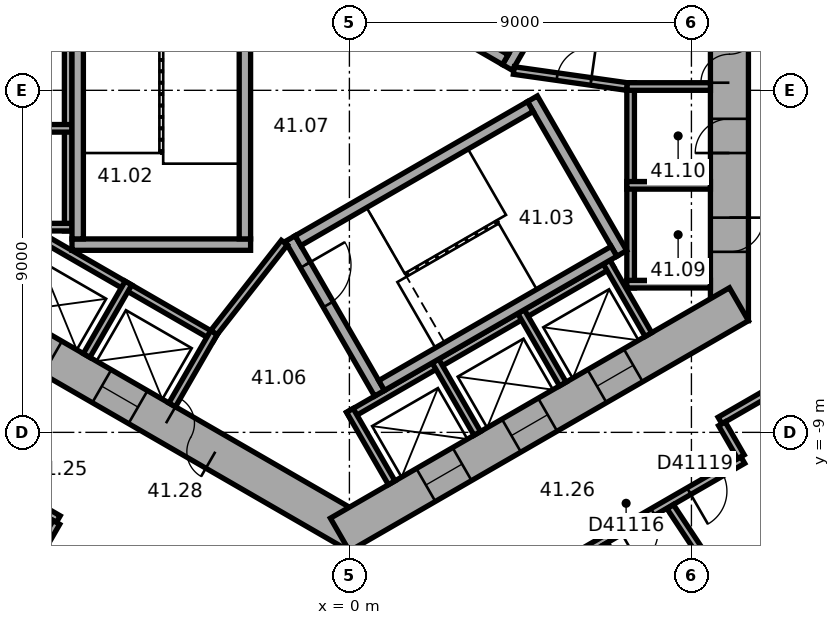
"""IFC4 building model, lengths in metres.
Left out: names, types, materials, properties, quantities, classifications, styles, units other than length and angle.
Written with IfcOpenShell. Run it as: python <this file> out.ifc"""

import sys

from ifc_helpers import new_model, si_unit, direction, frame, frame_2d, origin, place, context, subcontext, project, spatial, rectangle, extrude, element, fill, save


model = new_model("IFC4")
c1 = context("Model", 3, precision=1e-05, world=origin(), true_north=direction((0.0, 1.0)))
c2 = subcontext(c1, "Body", "Model", "MODEL_VIEW")
j1 = project(units=[si_unit("LENGTHUNIT", "METRE"), si_unit("PLANEANGLEUNIT", "RADIAN")], contexts=[c1])
p1 = place(None, origin())
s1 = spatial("IfcSite", under=j1, at=p1, CompositionType="ELEMENT")
p2 = place(p1, origin())
s2 = spatial("IfcBuilding", under=s1, at=p2, CompositionType="ELEMENT")
p3 = place(p2, frame((0.0, 0.0, 168.8)))
s3 = spatial("IfcBuildingStorey", under=s2, at=p3, CompositionType="ELEMENT", Elevation=168.8)
p4 = place(p3, frame((10.0, -6.062, 0.0), z_axis=(0.0, 0.0, 1.0), x_axis=(0.0, 1.0, 0.0)))
e1 = element("IfcWall", 1, at=p4, inside=s3, PredefinedType="SHEAR", context=c2, shape_type="SweptSolid", body=[
    extrude(rectangle(XDim=12.125, YDim=1.0, at=frame_2d((6.062, 0.0))), origin(), (0.0, 0.0, 1.0), 3.7),
])
p5 = place(p4, frame((6.262, 0.0, 0.0)))
e2 = element("IfcOpeningElement", 2, at=p5, cuts=e1, PredefinedType="OPENING", context=c2, shape_type="SweptSolid", body=[
    extrude(rectangle(XDim=1.5, YDim=2.1, at=frame_2d((0.75, 1.05))), frame((0.0, 0.51, 0.0), z_axis=(0.0, -1.0, 0.0), x_axis=(1.0, 0.0, 0.0)), (0.0, 0.0, 1.0), 1.02),
])
p6 = place(p4, frame((1.812, 0.0, 0.0)))
e3 = element("IfcOpeningElement", 3, at=p6, cuts=e1, PredefinedType="OPENING", context=c2, shape_type="SweptSolid", body=[
    extrude(rectangle(XDim=0.9, YDim=2.1, at=frame_2d((0.45, 1.05))), frame((0.0, 0.51, 0.0), z_axis=(0.0, -1.0, 0.0), x_axis=(1.0, 0.0, 0.0)), (0.0, 0.0, 1.0), 1.02),
])
p7 = place(p4, frame((4.412, 0.0, 0.0)))
e4 = element("IfcOpeningElement", 4, at=p7, cuts=e1, PredefinedType="OPENING", context=c2, shape_type="SweptSolid", body=[
    extrude(rectangle(XDim=0.9, YDim=2.1, at=frame_2d((0.45, 1.05))), frame((0.0, 0.51, 0.0), z_axis=(0.0, -1.0, 0.0), x_axis=(1.0, 0.0, 0.0)), (0.0, 0.0, 1.0), 1.02),
])
p8 = place(p3, frame((-10.25, -5.629, 0.0), z_axis=(0.0, 0.0, 1.0), x_axis=(0.866022616891, -0.50000482701, 0.0)))
e5 = element("IfcWall", 5, at=p8, inside=s3, PredefinedType="SHEAR", context=c2, shape_type="SweptSolid", body=[
    extrude(rectangle(XDim=12.125, YDim=1.0, at=frame_2d((6.062, 0.0))), origin(), (0.0, 0.0, 1.0), 3.7),
])
p9 = place(p8, frame((6.262, 0.0, 0.0)))
e6 = element("IfcOpeningElement", 6, at=p9, cuts=e5, PredefinedType="OPENING", context=c2, shape_type="SweptSolid", body=[
    extrude(rectangle(XDim=1.5, YDim=2.1, at=frame_2d((0.75, 1.05))), frame((0.0, 0.51, 0.0), z_axis=(0.0, -1.0, 0.0), x_axis=(1.0, 0.0, 0.0)), (0.0, 0.0, 1.0), 1.02),
])
p10 = place(p8, frame((1.712, 0.0, 0.0)))
e7 = element("IfcOpeningElement", 7, at=p10, cuts=e5, PredefinedType="OPENING", context=c2, shape_type="SweptSolid", body=[
    extrude(rectangle(XDim=1.1, YDim=2.1, at=frame_2d((0.55, 1.05))), frame((0.0, 0.51, 0.0), z_axis=(0.0, -1.0, 0.0), x_axis=(1.0, 0.0, 0.0)), (0.0, 0.0, 1.0), 1.02),
])
p11 = place(p8, frame((4.312, 0.0, 0.0)))
e8 = element("IfcOpeningElement", 8, at=p11, cuts=e5, PredefinedType="OPENING", context=c2, shape_type="SweptSolid", body=[
    extrude(rectangle(XDim=1.1, YDim=2.1, at=frame_2d((0.55, 1.05))), frame((0.0, 0.51, 0.0), z_axis=(0.0, -1.0, 0.0), x_axis=(1.0, 0.0, 0.0)), (0.0, 0.0, 1.0), 1.02),
])
p12 = place(p3, frame((-0.25, -11.691, 0.0), z_axis=(0.0, 0.0, 1.0), x_axis=(0.866022616891, 0.50000482701, 0.0)))
e9 = element("IfcWall", 9, at=p12, inside=s3, PredefinedType="SHEAR", context=c2, shape_type="SweptSolid", body=[
    extrude(rectangle(XDim=12.125, YDim=1.0, at=frame_2d((6.062, 0.0))), origin(), (0.0, 0.0, 1.0), 3.7),
])
p13 = place(p12, frame((2.612, 0.0, 0.0)))
e10 = element("IfcOpeningElement", 10, at=p13, cuts=e9, PredefinedType="OPENING", context=c2, shape_type="SweptSolid", body=[
    extrude(rectangle(XDim=1.1, YDim=2.1, at=frame_2d((0.55, 1.05))), frame((0.0, 0.51, 0.0), z_axis=(0.0, -1.0, 0.0), x_axis=(1.0, 0.0, 0.0)), (0.0, 0.0, 1.0), 1.02),
])
p14 = place(p12, frame((5.212, 0.0, 0.0)))
e11 = element("IfcOpeningElement", 11, at=p14, cuts=e9, PredefinedType="OPENING", context=c2, shape_type="SweptSolid", body=[
    extrude(rectangle(XDim=1.1, YDim=2.1, at=frame_2d((0.55, 1.05))), frame((0.0, 0.51, 0.0), z_axis=(0.0, -1.0, 0.0), x_axis=(1.0, 0.0, 0.0)), (0.0, 0.0, 1.0), 1.02),
])
p15 = place(p12, frame((7.812, 0.0, 0.0)))
e12 = element("IfcOpeningElement", 12, at=p15, cuts=e9, PredefinedType="OPENING", context=c2, shape_type="SweptSolid", body=[
    extrude(rectangle(XDim=1.1, YDim=2.1, at=frame_2d((0.55, 1.05))), frame((0.0, 0.51, 0.0), z_axis=(0.0, -1.0, 0.0), x_axis=(1.0, 0.0, 0.0)), (0.0, 0.0, 1.0), 1.02),
])
p16 = place(p3, frame((7.4, -5.2, 0.0), z_axis=(0.0, 0.0, 1.0), x_axis=(0.0, 1.0, 0.0)))
e13 = element("IfcWall", 13, at=p16, inside=s3, PredefinedType="PARTITIONING", context=c2, shape_type="SweptSolid", body=[
    extrude(rectangle(XDim=5.4, YDim=0.2, at=frame_2d((2.7, 0.0))), origin(), (0.0, 0.0, 1.0), 3.42),
])
for number, where, z_axis, x_axis in (
    (14, (7.3, -5.1, 0.0), (0.0, 0.0, 1.0), (1.0, 0.0, 0.0)),
    (15, (7.3, -2.5, 0.0), (0.0, 0.0, 1.0), (1.0, 0.0, 0.0)),
    (16, (7.3, 0.1, 0.0), (0.0, 0.0, 1.0), (1.0, 0.0, 0.0)),
):
    element("IfcWall", number, at=place(p3, frame(where, z_axis=z_axis, x_axis=x_axis)), inside=s3, PredefinedType="PARTITIONING", context=c2, shape_type="SweptSolid", body=[
        extrude(rectangle(XDim=2.2, YDim=0.2, at=frame_2d((1.1, 0.0))), origin(), (0.0, 0.0, 1.0), 3.42),
    ])
p17 = place(p3, frame((-7.4, 4.3, 0.0), z_axis=(0.0, 0.0, 1.0), x_axis=(0.0, -1.0, 0.0)))
e17 = element("IfcWall", 17, at=p17, inside=s3, PredefinedType="PARTITIONING", context=c2, shape_type="SweptSolid", body=[
    extrude(rectangle(XDim=8.0, YDim=0.2, at=frame_2d((4.0, 0.0))), origin(), (0.0, 0.0, 1.0), 3.42),
])
for number, where, z_axis, x_axis in (
    (18, (-7.3, -1.0, 0.0), (0.0, 0.0, 1.0), (-1.0, 0.0, 0.0)),
    (19, (-7.3, -3.6, 0.0), (0.0, 0.0, 1.0), (-1.0, 0.0, 0.0)),
):
    element("IfcWall", number, at=place(p3, frame(where, z_axis=z_axis, x_axis=x_axis)), inside=s3, PredefinedType="PARTITIONING", context=c2, shape_type="SweptSolid", body=[
        extrude(rectangle(XDim=2.2, YDim=0.2, at=frame_2d((1.1, 0.0))), origin(), (0.0, 0.0, 1.0), 3.42),
    ])
p18 = place(p3, frame((-8.203, -3.809, 0.0), z_axis=(0.0, 0.0, 1.0), x_axis=(0.866028230842, -0.499995103361, 0.0)))
e20 = element("IfcWall", 20, at=p18, inside=s3, PredefinedType="PARTITIONING", context=c2, shape_type="SweptSolid", body=[
    extrude(rectangle(XDim=5.4, YDim=0.2, at=frame_2d((2.7, 0.0))), origin(), (0.0, 0.0, 1.0), 3.42),
])
p19 = place(p3, frame((-5.815, -5.072, 0.0), z_axis=(0.0, 0.0, 1.0), x_axis=(-0.499946605688, -0.86605622881, 0.0)))
e21 = element("IfcWall", 21, at=p19, inside=s3, PredefinedType="PARTITIONING", context=c2, shape_type="SweptSolid", body=[
    extrude(rectangle(XDim=2.2, YDim=0.2, at=frame_2d((1.1, 0.0))), origin(), (0.0, 0.0, 1.0), 3.42),
])
p20 = place(p3, frame((-3.563, -6.372, 0.0), z_axis=(0.0, 0.0, 1.0), x_axis=(-0.499994660107, -0.866028486751, 0.0)))
e22 = element("IfcWall", 22, at=p20, inside=s3, PredefinedType="PARTITIONING", context=c2, shape_type="SweptSolid", body=[
    extrude(rectangle(XDim=2.2, YDim=0.2, at=frame_2d((1.1, 0.0))), origin(), (0.0, 0.0, 1.0), 3.42),
])
p21 = place(p3, frame((-0.024, -8.559, 0.0), z_axis=(0.0, 0.0, 1.0), x_axis=(0.866026010844, 0.49999894854, 0.0)))
e23 = element("IfcWall", 23, at=p21, inside=s3, PredefinedType="PARTITIONING", context=c2, shape_type="SweptSolid", body=[
    extrude(rectangle(XDim=8.0, YDim=0.2, at=frame_2d((4.0, 0.0))), origin(), (0.0, 0.0, 1.0), 3.42),
])
for number, where, z_axis, x_axis in (
    (24, (0.013, -8.422, 0.0), (0.0, 0.0, 1.0), (0.5, -0.866, 0.0)),
    (25, (2.264, -7.122, 0.0), (0.0, 0.0, 1.0), (0.5, -0.866, 0.0)),
    (26, (4.516, -5.822, 0.0), (0.0, 0.0, 1.0), (0.5, -0.866, 0.0)),
    (27, (6.768, -4.522, 0.0), (0.0, 0.0, 1.0), (0.5, -0.866, 0.0)),
):
    element("IfcWall", number, at=place(p3, frame(where, z_axis=z_axis, x_axis=x_axis)), inside=s3, PredefinedType="PARTITIONING", context=c2, shape_type="SweptSolid", body=[
        extrude(rectangle(XDim=2.2, YDim=0.2, at=frame_2d((1.1, 0.0))), origin(), (0.0, 0.0, 1.0), 3.42),
    ])
p22 = place(p3, frame((4.158, 0.602, 0.0), z_axis=(0.0, 0.0, 1.0), x_axis=(0.499977259774, 0.866038532462, 0.0)))
e28 = element("IfcWall", 28, at=p22, inside=s3, PredefinedType="SHEAR", context=c2, shape_type="SweptSolid", body=[
    extrude(rectangle(XDim=4.7, YDim=0.3, at=frame_2d((2.35, 0.0))), origin(), (0.0, 0.0, 1.0), 3.42),
])
p23 = place(p22, frame((0.8, 0.0, 0.0)))
e29 = element("IfcOpeningElement", 29, at=p23, cuts=e28, PredefinedType="OPENING", context=c2, shape_type="SweptSolid", body=[
    extrude(rectangle(XDim=1.2, YDim=2.1, at=frame_2d((0.6, 1.05))), frame((0.0, 0.16, 0.0), z_axis=(0.0, -1.0, 0.0), x_axis=(1.0, 0.0, 0.0)), (0.0, 0.0, 1.0), 0.32),
])
p24 = place(p3, frame((4.103, 0.807, 0.0), z_axis=(0.0, 0.0, 1.0), x_axis=(-0.866027801685, 0.499995846692, 0.0)))
e30 = element("IfcWall", 30, at=p24, inside=s3, PredefinedType="SHEAR", context=c2, shape_type="SweptSolid", body=[
    extrude(rectangle(XDim=7.06, YDim=0.3, at=frame_2d((3.53, 0.0))), origin(), (0.0, 0.0, 1.0), 3.42),
])
p25 = place(p3, frame((-2.6, -4.06, 0.0), z_axis=(0.0, 0.0, 1.0), x_axis=(-1.0, 0.0, 0.0)))
e31 = element("IfcWall", 31, at=p25, inside=s3, PredefinedType="SHEAR", context=c2, shape_type="SweptSolid", body=[
    extrude(rectangle(XDim=4.7, YDim=0.3, at=frame_2d((2.35, 0.0))), origin(), (0.0, 0.0, 1.0), 3.42),
])
for number, where, z_axis, x_axis in (
    (32, (-2.75, 3.15, 0.0), (0.0, 0.0, 1.0), (0.0, -1.0, 0.0)),
    (33, (-7.15, 3.15, 0.0), (0.0, 0.0, 1.0), (0.0, -1.0, 0.0)),
):
    element("IfcWall", number, at=place(p3, frame(where, z_axis=z_axis, x_axis=x_axis)), inside=s3, PredefinedType="SHEAR", context=c2, shape_type="SweptSolid", body=[
        extrude(rectangle(XDim=7.06, YDim=0.3, at=frame_2d((3.53, 0.0))), origin(), (0.0, 0.0, 1.0), 3.42),
    ])
p26 = place(p3, frame((-1.558, -3.902, 0.0), z_axis=(0.0, 0.0, 1.0), x_axis=(0.499977259774, -0.866038532462, 0.0)))
e34 = element("IfcWall", 34, at=p26, inside=s3, PredefinedType="SHEAR", context=c2, shape_type="SweptSolid", body=[
    extrude(rectangle(XDim=4.7, YDim=0.3, at=frame_2d((2.35, 0.0))), origin(), (0.0, 0.0, 1.0), 3.42),
])
p27 = place(p26, frame((0.8, 0.0, 0.0)))
e35 = element("IfcOpeningElement", 35, at=p27, cuts=e34, PredefinedType="OPENING", context=c2, shape_type="SweptSolid", body=[
    extrude(rectangle(XDim=1.2, YDim=2.1, at=frame_2d((0.6, 1.05))), frame((0.0, 0.16, 0.0), z_axis=(0.0, -1.0, 0.0), x_axis=(1.0, 0.0, 0.0)), (0.0, 0.0, 1.0), 0.32),
])
p28 = place(p3, frame((4.816, -0.222, 0.0), z_axis=(0.0, 0.0, 1.0), x_axis=(0.499977259774, -0.866038532462, 0.0)))
e36 = element("IfcWall", 36, at=p28, inside=s3, PredefinedType="SHEAR", context=c2, shape_type="SweptSolid", body=[
    extrude(rectangle(XDim=4.7, YDim=0.3, at=frame_2d((2.35, 0.0))), origin(), (0.0, 0.0, 1.0), 3.42),
])
for number, where, z_axis, x_axis in (
    (37, (-1.353, -3.957, 0.0), (0.0, 0.0, 1.0), (0.866, 0.5, 0.0)),
    (38, (0.847, -7.767, 0.0), (0.0, 0.0, 1.0), (0.866, 0.5, 0.0)),
):
    element("IfcWall", number, at=place(p3, frame(where, z_axis=z_axis, x_axis=x_axis)), inside=s3, PredefinedType="SHEAR", context=c2, shape_type="SweptSolid", body=[
        extrude(rectangle(XDim=7.06, YDim=0.3, at=frame_2d((3.53, 0.0))), origin(), (0.0, 0.0, 1.0), 3.42),
    ])
p29 = place(p3, frame((4.327, 0.521, 0.0), z_axis=(0.0, 0.0, 1.0), x_axis=(0.990124376366, -0.14019172346, 0.0)))
e39 = element("IfcWall", 39, at=p29, inside=s3, PredefinedType="PARTITIONING", context=c2, shape_type="SweptSolid", body=[
    extrude(rectangle(XDim=3.002, YDim=0.2, at=frame_2d((1.501, 0.0))), origin(), (0.0, 0.0, 1.0), 3.42),
])
p30 = place(p29, frame((1.15, 0.0, 0.0)))
e40 = element("IfcOpeningElement", 40, at=p30, cuts=e39, PredefinedType="OPENING", context=c2, shape_type="SweptSolid", body=[
    extrude(rectangle(XDim=0.9, YDim=2.1, at=frame_2d((0.45, 1.05))), frame((0.0, 0.11, 0.0), z_axis=(0.0, -1.0, 0.0), x_axis=(1.0, 0.0, 0.0)), (0.0, 0.0, 1.0), 0.22),
])
p31 = place(p3, frame((-1.712, -4.008, 0.0), z_axis=(0.0, 0.0, 1.0), x_axis=(-0.616549420702, -0.787316208287, 0.0)))
e41 = element("IfcWall", 41, at=p31, inside=s3, PredefinedType="PARTITIONING", context=c2, shape_type="SweptSolid", body=[
    extrude(rectangle(XDim=3.002, YDim=0.2, at=frame_2d((1.501, 0.0))), origin(), (0.0, 0.0, 1.0), 3.42),
])
p32 = place(p3, frame((-11.435, -9.103, 0.0), z_axis=(0.0, 0.0, 1.0), x_axis=(0.866007399799, -0.500031182522, 0.0)))
e42 = element("IfcWall", 42, at=p32, inside=s3, PredefinedType="PARTITIONING", context=c2, shape_type="SweptSolid", body=[
    extrude(rectangle(XDim=4.358, YDim=0.2, at=frame_2d((2.179, 0.0))), origin(), (0.0, 0.0, 1.0), 3.42),
])
p33 = place(p3, frame((-11.235, -17.474, 0.0), z_axis=(0.0, 0.0, 1.0), x_axis=(0.500009260695, 0.866020057054, 0.0)))
e43 = element("IfcWall", 43, at=p33, inside=s3, PredefinedType="PARTITIONING", context=c2, shape_type="SweptSolid", body=[
    extrude(rectangle(XDim=7.049, YDim=0.2, at=frame_2d((3.524, 0.0))), origin(), (0.0, 0.0, 1.0), 2.87),
])
p34 = place(p33, frame((3.024, 0.0, 0.0)))
e44 = element("IfcOpeningElement", 44, at=p34, cuts=e43, PredefinedType="OPENING", context=c2, shape_type="SweptSolid", body=[
    extrude(rectangle(XDim=1.0, YDim=2.1, at=frame_2d((0.5, 1.05))), frame((0.0, 0.11, 0.0), z_axis=(0.0, -1.0, 0.0), x_axis=(1.0, 0.0, 0.0)), (0.0, 0.0, 1.0), 0.22),
])
p35 = place(p3, frame((4.782, -12.944, 0.0), z_axis=(0.0, 0.0, 1.0), x_axis=(0.866022506829, 0.50000501764, 0.0)))
e45 = element("IfcWall", 45, at=p35, inside=s3, PredefinedType="PARTITIONING", context=c2, shape_type="SweptSolid", body=[
    extrude(rectangle(XDim=6.432, YDim=0.2, at=frame_2d((3.216, 0.0))), origin(), (0.0, 0.0, 1.0), 3.42),
])
p36 = place(p35, frame((2.704, 0.0, 0.0)))
e46 = element("IfcOpeningElement", 46, at=p36, cuts=e45, PredefinedType="OPENING", context=c2, shape_type="SweptSolid", body=[
    extrude(rectangle(XDim=1.0, YDim=2.1, at=frame_2d((0.5, 1.05))), frame((0.0, 0.11, 0.0), z_axis=(0.0, -1.0, 0.0), x_axis=(1.0, 0.0, 0.0)), (0.0, 0.0, 1.0), 0.22),
])
p37 = place(p35, frame((4.795, 0.0, 0.0)))
e47 = element("IfcOpeningElement", 47, at=p37, cuts=e45, PredefinedType="OPENING", context=c2, shape_type="SweptSolid", body=[
    extrude(rectangle(XDim=1.0, YDim=2.1, at=frame_2d((0.5, 1.05))), frame((0.0, 0.11, 0.0), z_axis=(0.0, -1.0, 0.0), x_axis=(1.0, 0.0, 0.0)), (0.0, 0.0, 1.0), 0.22),
])
p38 = place(p3, frame((6.737, -11.931, 0.0), z_axis=(0.0, 0.0, 1.0), x_axis=(0.500004234368, -0.866022959057, 0.0)))
e48 = element("IfcWall", 48, at=p38, inside=s3, PredefinedType="PARTITIONING", context=c2, shape_type="SweptSolid", body=[
    extrude(rectangle(XDim=2.5, YDim=0.12, at=frame_2d((1.25, 0.0))), origin(), (0.0, 0.0, 1.0), 3.42),
])
p39 = place(p38, frame((0.8, 0.0, 0.0)))
e49 = element("IfcOpeningElement", 49, at=p39, cuts=e48, PredefinedType="OPENING", context=c2, shape_type="SweptSolid", body=[
    extrude(rectangle(XDim=0.9, YDim=2.1, at=frame_2d((0.45, 1.05))), frame((0.0, 0.07, 0.0), z_axis=(0.0, -1.0, 0.0), x_axis=(1.0, 0.0, 0.0)), (0.0, 0.0, 1.0), 0.14),
])
p40 = place(p3, frame((9.752, -8.688, 0.0), z_axis=(0.0, 0.0, 1.0), x_axis=(0.865974105138, 0.500088841337, 0.0)))
e50 = element("IfcWall", 50, at=p40, inside=s3, PredefinedType="PARTITIONING", context=c2, shape_type="SweptSolid", body=[
    extrude(rectangle(XDim=1.961, YDim=0.2, at=frame_2d((0.98, 0.0))), origin(), (0.0, 0.0, 1.0), 3.42),
])
p41 = place(p3, frame((10.302, -9.642, 0.0), z_axis=(0.0, 0.0, 1.0), x_axis=(-0.500074377092, 0.865982457891, 0.0)))
e51 = element("IfcWall", 51, at=p41, inside=s3, PredefinedType="PARTITIONING", context=c2, shape_type="SweptSolid", body=[
    extrude(rectangle(XDim=1.001, YDim=0.2, at=frame_2d((0.5, 0.0))), origin(), (0.0, 0.0, 1.0), 3.42),
])
p42 = place(p3, frame((12.281, -16.755, 0.0), z_axis=(0.0, 0.0, 1.0), x_axis=(-0.551925794663, 0.833893228888, 0.0)))
e52 = element("IfcWall", 52, at=p42, inside=s3, PredefinedType="PARTITIONING", context=c2, shape_type="SweptSolid", body=[
    extrude(rectangle(XDim=6.953, YDim=0.2, at=frame_2d((3.476, 0.0))), origin(), (0.0, 0.0, 1.0), 3.42),
])
p43 = place(p5, origin())
e53 = element("IfcDoor", 53, at=p43, inside=s3, OperationType="DOUBLE_DOOR_SINGLE_SWING", PredefinedType="DOOR", context=c2, shape_type="SweptSolid", body=[
    extrude(rectangle(XDim=1.5, YDim=2.1, at=frame_2d((0.75, 1.05))), frame((0.0, 0.025, 0.0), z_axis=(0.0, -1.0, 0.0), x_axis=(1.0, 0.0, 0.0)), (0.0, 0.0, 1.0), 0.05),
])
fill(e2, e53)
p44 = place(p9, origin())
e54 = element("IfcDoor", 54, at=p44, inside=s3, OperationType="DOUBLE_DOOR_SINGLE_SWING", PredefinedType="DOOR", context=c2, shape_type="SweptSolid", body=[
    extrude(rectangle(XDim=1.5, YDim=2.1, at=frame_2d((0.75, 1.05))), frame((0.0, 0.025, 0.0), z_axis=(0.0, -1.0, 0.0), x_axis=(1.0, 0.0, 0.0)), (0.0, 0.0, 1.0), 0.05),
])
fill(e6, e54)
p45 = place(p27, origin())
e55 = element("IfcDoor", 55, at=p45, inside=s3, OperationType="SINGLE_SWING_RIGHT", PredefinedType="DOOR", context=c2, shape_type="SweptSolid", body=[
    extrude(rectangle(XDim=1.2, YDim=2.1, at=frame_2d((0.6, 1.05))), frame((0.0, 0.025, 0.0), z_axis=(0.0, -1.0, 0.0), x_axis=(1.0, 0.0, 0.0)), (0.0, 0.0, 1.0), 0.05),
])
fill(e35, e55)
p46 = place(p30, origin())
e56 = element("IfcDoor", 56, at=p46, inside=s3, OperationType="SINGLE_SWING_LEFT", PredefinedType="DOOR", context=c2, shape_type="SweptSolid", body=[
    extrude(rectangle(XDim=0.9, YDim=2.1, at=frame_2d((0.45, 1.05))), frame((0.0, 0.025, 0.0), z_axis=(0.0, -1.0, 0.0), x_axis=(1.0, 0.0, 0.0)), (0.0, 0.0, 1.0), 0.05),
])
fill(e40, e56)
p47 = place(p6, origin())
e57 = element("IfcDoor", 57, at=p47, inside=s3, OperationType="SINGLE_SWING_LEFT", PredefinedType="DOOR", context=c2, shape_type="SweptSolid", body=[
    extrude(rectangle(XDim=0.9, YDim=2.1, at=frame_2d((0.45, 1.05))), frame((0.0, 0.025, 0.0), z_axis=(0.0, -1.0, 0.0), x_axis=(1.0, 0.0, 0.0)), (0.0, 0.0, 1.0), 0.05),
])
fill(e3, e57)
p48 = place(p7, origin())
e58 = element("IfcDoor", 58, at=p48, inside=s3, OperationType="SINGLE_SWING_LEFT", PredefinedType="DOOR", context=c2, shape_type="SweptSolid", body=[
    extrude(rectangle(XDim=0.9, YDim=2.1, at=frame_2d((0.45, 1.05))), frame((0.0, 0.025, 0.0), z_axis=(0.0, -1.0, 0.0), x_axis=(1.0, 0.0, 0.0)), (0.0, 0.0, 1.0), 0.05),
])
fill(e4, e58)
p49 = place(p10, origin())
e59 = element("IfcDoor", 59, at=p49, inside=s3, OperationType="DOUBLE_DOOR_SLIDING", PredefinedType="DOOR", context=c2, shape_type="SweptSolid", body=[
    extrude(rectangle(XDim=1.1, YDim=2.1, at=frame_2d((0.55, 1.05))), frame((0.0, 0.025, 0.0), z_axis=(0.0, -1.0, 0.0), x_axis=(1.0, 0.0, 0.0)), (0.0, 0.0, 1.0), 0.05),
])
fill(e7, e59)
p50 = place(p11, origin())
e60 = element("IfcDoor", 60, at=p50, inside=s3, OperationType="DOUBLE_DOOR_SLIDING", PredefinedType="DOOR", context=c2, shape_type="SweptSolid", body=[
    extrude(rectangle(XDim=1.1, YDim=2.1, at=frame_2d((0.55, 1.05))), frame((0.0, 0.025, 0.0), z_axis=(0.0, -1.0, 0.0), x_axis=(1.0, 0.0, 0.0)), (0.0, 0.0, 1.0), 0.05),
])
fill(e8, e60)
p51 = place(p13, origin())
e61 = element("IfcDoor", 61, at=p51, inside=s3, OperationType="DOUBLE_DOOR_SLIDING", PredefinedType="DOOR", context=c2, shape_type="SweptSolid", body=[
    extrude(rectangle(XDim=1.1, YDim=2.1, at=frame_2d((0.55, 1.05))), frame((0.0, 0.025, 0.0), z_axis=(0.0, -1.0, 0.0), x_axis=(1.0, 0.0, 0.0)), (0.0, 0.0, 1.0), 0.05),
])
fill(e10, e61)
p52 = place(p14, origin())
e62 = element("IfcDoor", 62, at=p52, inside=s3, OperationType="DOUBLE_DOOR_SLIDING", PredefinedType="DOOR", context=c2, shape_type="SweptSolid", body=[
    extrude(rectangle(XDim=1.1, YDim=2.1, at=frame_2d((0.55, 1.05))), frame((0.0, 0.025, 0.0), z_axis=(0.0, -1.0, 0.0), x_axis=(1.0, 0.0, 0.0)), (0.0, 0.0, 1.0), 0.05),
])
fill(e11, e62)
p53 = place(p15, origin())
e63 = element("IfcDoor", 63, at=p53, inside=s3, OperationType="DOUBLE_DOOR_SLIDING", PredefinedType="DOOR", context=c2, shape_type="SweptSolid", body=[
    extrude(rectangle(XDim=1.1, YDim=2.1, at=frame_2d((0.55, 1.05))), frame((0.0, 0.025, 0.0), z_axis=(0.0, -1.0, 0.0), x_axis=(1.0, 0.0, 0.0)), (0.0, 0.0, 1.0), 0.05),
])
fill(e12, e63)
p54 = place(p36, origin())
e64 = element("IfcDoor", 64, at=p54, inside=s3, OperationType="SINGLE_SWING_LEFT", PredefinedType="DOOR", context=c2, shape_type="SweptSolid", body=[
    extrude(rectangle(XDim=1.0, YDim=2.1, at=frame_2d((0.5, 1.05))), frame((0.0, 0.025, 0.0), z_axis=(0.0, -1.0, 0.0), x_axis=(1.0, 0.0, 0.0)), (0.0, 0.0, 1.0), 0.05),
])
fill(e46, e64)
p55 = place(p37, origin())
e65 = element("IfcDoor", 65, at=p55, inside=s3, OperationType="SINGLE_SWING_LEFT", PredefinedType="DOOR", context=c2, shape_type="SweptSolid", body=[
    extrude(rectangle(XDim=1.0, YDim=2.1, at=frame_2d((0.5, 1.05))), frame((0.0, 0.025, 0.0), z_axis=(0.0, -1.0, 0.0), x_axis=(1.0, 0.0, 0.0)), (0.0, 0.0, 1.0), 0.05),
])
fill(e47, e65)
save(model, sys.argv[1])
